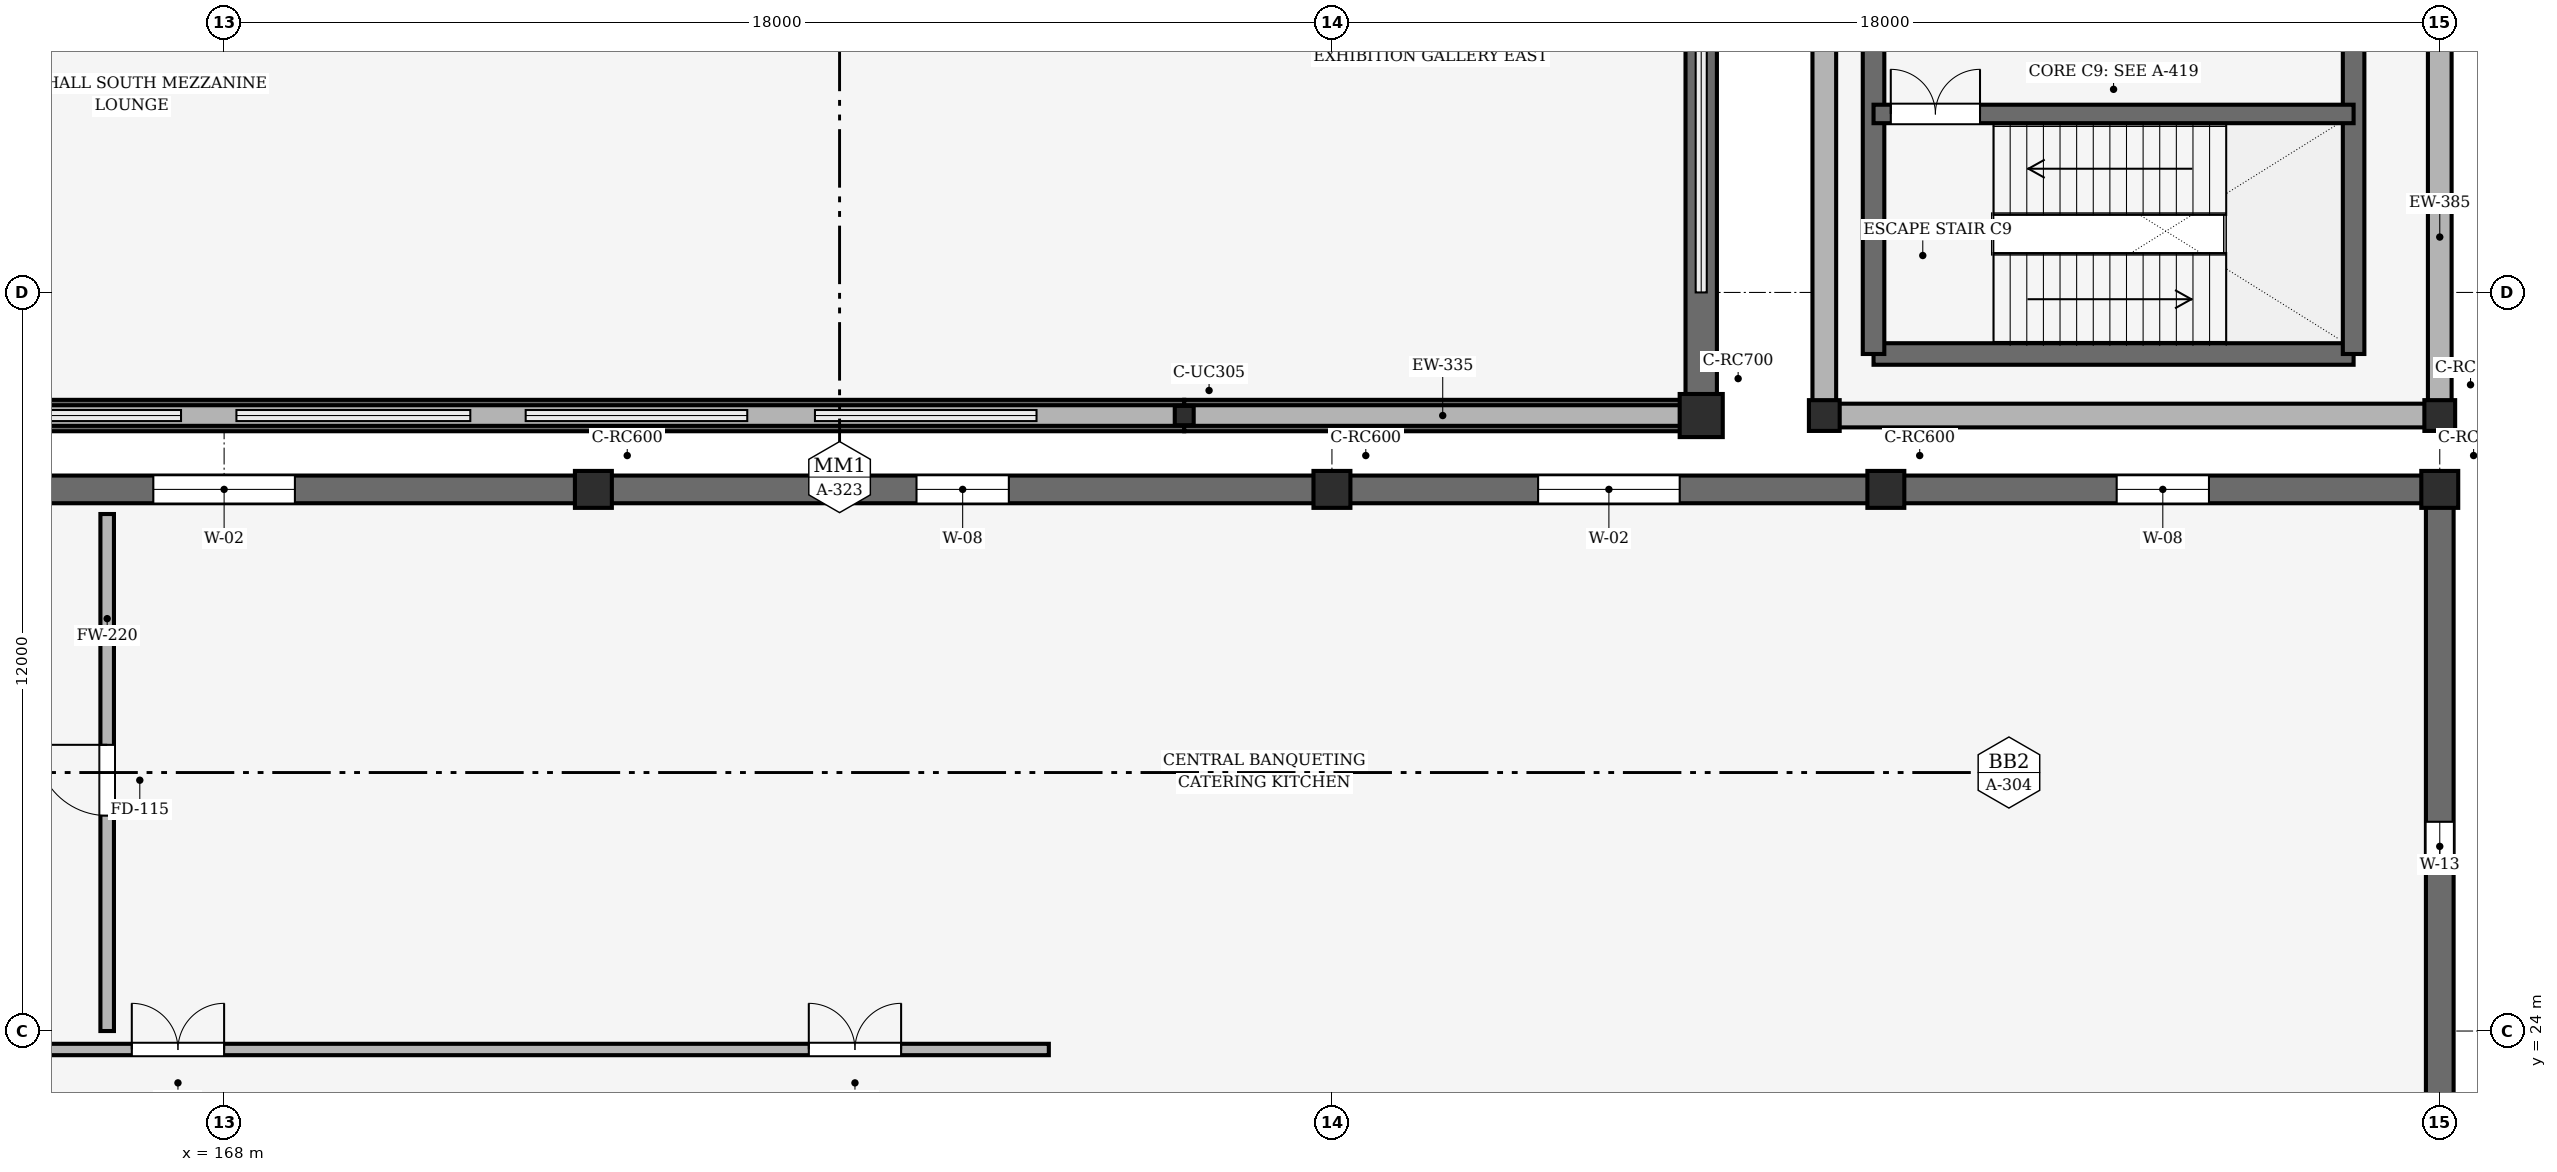
"""IFC4 building model, lengths in metres.
Left out: names, types, materials, properties, quantities, classifications, styles, units other than length and angle.
Written with IfcOpenShell. Run it as: python <this file> out.ifc"""

import sys

from ifc_helpers import new_model, si_unit, direction, frame, frame_2d, origin, origin_2d, place, context, subcontext, project, spatial, rectangle, i_section, extrude, element, fill, save


model = new_model("IFC4")
c1 = context("Model", 3, precision=1e-05, world=origin(), true_north=direction((0.0, 1.0)))
c2 = subcontext(c1, "Body", "Model", "MODEL_VIEW")
j1 = project(units=[si_unit("LENGTHUNIT", "METRE"), si_unit("PLANEANGLEUNIT", "RADIAN")], contexts=[c1])
p1 = place(None, origin())
s1 = spatial("IfcSite", under=j1, at=p1, CompositionType="ELEMENT")
p2 = place(p1, origin())
s2 = spatial("IfcBuilding", under=s1, at=p2, CompositionType="ELEMENT")
p3 = place(p2, frame((0.0, 0.0, 5.4)))
s3 = spatial("IfcBuildingStorey", under=s2, at=p3, CompositionType="ELEMENT", Elevation=5.4)
p4 = place(p3, frame((192.0, 34.0, 0.0), z_axis=(0.0, 0.0, 1.0), x_axis=(1.0, 0.0, 0.0)))
e1 = element("IfcColumn", 1, at=p4, inside=s3, PredefinedType="COLUMN", context=c2, shape_type="SweptSolid", body=[
    extrude(rectangle(XDim=0.7, YDim=0.7, at=origin_2d()), origin(), (0.0, 0.0, 1.0), 6.7),
])
p5 = place(p3, frame((183.6, 34.0, 0.0), z_axis=(0.0, 0.0, 1.0), x_axis=(1.0, 0.0, 0.0)))
e2 = element("IfcColumn", 2, at=p5, inside=s3, PredefinedType="COLUMN", context=c2, shape_type="SweptSolid", body=[
    extrude(i_section(OverallWidth=0.307, OverallDepth=0.314, WebThickness=0.012, FlangeThickness=0.019, FilletRadius=0.015, at=origin_2d()), origin(), (0.0, 0.0, 1.0), 6.5),
])
for number, where, z_axis, x_axis in (
    (3, (174.0, 32.8, 0.0), (0.0, 0.0, 1.0), (1.0, 0.0, 0.0)),
    (4, (186.0, 32.8, 0.0), (0.0, 0.0, 1.0), (1.0, 0.0, 0.0)),
    (5, (195.0, 32.8, 0.0), (0.0, 0.0, 1.0), (1.0, 0.0, 0.0)),
    (6, (204.0, 32.8, 0.0), (0.0, 0.0, 1.0), (1.0, 0.0, 0.0)),
):
    element("IfcColumn", number, at=place(p3, frame(where, z_axis=z_axis, x_axis=x_axis)), inside=s3, PredefinedType="COLUMN", context=c2, shape_type="SweptSolid", body=[
        extrude(rectangle(XDim=0.6, YDim=0.6, at=origin_2d()), origin(), (0.0, 0.0, 1.0), 5.4),
    ])
for number, where, z_axis, x_axis in (
    (7, (194.0, 34.0, 0.0), (0.0, 0.0, 1.0), (1.0, 0.0, 0.0)),
    (8, (204.0, 34.0, 0.0), (0.0, 0.0, 1.0), (1.0, 0.0, 0.0)),
):
    element("IfcColumn", number, at=place(p3, frame(where, z_axis=z_axis, x_axis=x_axis)), inside=s3, PredefinedType="COLUMN", context=c2, shape_type="SweptSolid", body=[
        extrude(rectangle(XDim=0.5, YDim=0.5, at=origin_2d()), origin(), (0.0, 0.0, 1.0), 5.4),
    ])
p6 = place(p3, frame((192.0, 34.0, 0.0), z_axis=(0.0, 0.0, 1.0), x_axis=(0.0, 1.0, 0.0)))
e9 = element("IfcWall", 9, at=p6, inside=s3, PredefinedType="SOLIDWALL", context=c2, shape_type="SweptSolid", body=[
    extrude(rectangle(XDim=14.0, YDim=0.51, at=frame_2d((7.0, 0.0))), origin(), (0.0, 0.0, 1.0), 3.65),
])
p7 = place(p3, frame((148.4, 34.0, 0.0), z_axis=(0.0, 0.0, 1.0), x_axis=(1.0, 0.0, 0.0)))
e10 = element("IfcWall", 10, at=p7, inside=s3, PredefinedType="SOLIDWALL", context=c2, shape_type="SweptSolid", body=[
    extrude(rectangle(XDim=35.2, YDim=0.51, at=frame_2d((17.6, 0.0))), origin(), (0.0, 0.0, 1.0), 1.05),
])
p8 = place(p3, frame((183.6, 34.0, 0.0), z_axis=(0.0, 0.0, 1.0), x_axis=(1.0, 0.0, 0.0)))
e11 = element("IfcWall", 11, at=p8, inside=s3, PredefinedType="SOLIDWALL", context=c2, shape_type="SweptSolid", body=[
    extrude(rectangle(XDim=8.4, YDim=0.51, at=frame_2d((4.2, 0.0))), origin(), (0.0, 0.0, 1.0), 6.4),
])
p9 = place(p3, frame((174.0, 32.8, 0.0), z_axis=(0.0, 0.0, 1.0), x_axis=(-1.0, 0.0, 0.0)))
e12 = element("IfcWall", 12, at=p9, inside=s3, PredefinedType="SOLIDWALL", context=c2, shape_type="SweptSolid", body=[
    extrude(rectangle(XDim=12.0, YDim=0.45, at=frame_2d((6.0, 0.0))), origin(), (0.0, 0.0, 1.0), 4.3),
])
p10 = place(p9, frame((4.85, 0.0, 0.9)))
e13 = element("IfcOpeningElement", 13, at=p10, cuts=e12, PredefinedType="OPENING", context=c2, shape_type="SweptSolid", body=[
    extrude(rectangle(XDim=2.3, YDim=3.1, at=frame_2d((1.15, 1.55))), frame((0.0, 0.235, 0.0), z_axis=(0.0, -1.0, 0.0), x_axis=(1.0, 0.0, 0.0)), (0.0, 0.0, 1.0), 0.47),
])
p11 = place(p3, frame((186.0, 32.8, 0.0), z_axis=(0.0, 0.0, 1.0), x_axis=(-1.0, 0.0, 0.0)))
e14 = element("IfcWall", 14, at=p11, inside=s3, PredefinedType="SOLIDWALL", context=c2, shape_type="SweptSolid", body=[
    extrude(rectangle(XDim=12.0, YDim=0.45, at=frame_2d((6.0, 0.0))), origin(), (0.0, 0.0, 1.0), 4.3),
])
p12 = place(p11, frame((5.25, 0.0, 0.9)))
e15 = element("IfcOpeningElement", 15, at=p12, cuts=e14, PredefinedType="OPENING", context=c2, shape_type="SweptSolid", body=[
    extrude(rectangle(XDim=1.5, YDim=2.15, at=frame_2d((0.75, 1.075))), frame((0.0, 0.235, 0.0), z_axis=(0.0, -1.0, 0.0), x_axis=(1.0, 0.0, 0.0)), (0.0, 0.0, 1.0), 0.47),
])
p13 = place(p3, frame((195.0, 32.8, 0.0), z_axis=(0.0, 0.0, 1.0), x_axis=(-1.0, 0.0, 0.0)))
e16 = element("IfcWall", 16, at=p13, inside=s3, PredefinedType="SOLIDWALL", context=c2, shape_type="SweptSolid", body=[
    extrude(rectangle(XDim=9.0, YDim=0.45, at=frame_2d((4.5, 0.0))), origin(), (0.0, 0.0, 1.0), 4.3),
])
p14 = place(p13, frame((3.35, 0.0, 0.9)))
e17 = element("IfcOpeningElement", 17, at=p14, cuts=e16, PredefinedType="OPENING", context=c2, shape_type="SweptSolid", body=[
    extrude(rectangle(XDim=2.3, YDim=3.1, at=frame_2d((1.15, 1.55))), frame((0.0, 0.235, 0.0), z_axis=(0.0, -1.0, 0.0), x_axis=(1.0, 0.0, 0.0)), (0.0, 0.0, 1.0), 0.47),
])
p15 = place(p3, frame((204.0, 32.8, 0.0), z_axis=(0.0, 0.0, 1.0), x_axis=(-1.0, 0.0, 0.0)))
e18 = element("IfcWall", 18, at=p15, inside=s3, PredefinedType="SOLIDWALL", context=c2, shape_type="SweptSolid", body=[
    extrude(rectangle(XDim=9.0, YDim=0.45, at=frame_2d((4.5, 0.0))), origin(), (0.0, 0.0, 1.0), 4.3),
])
p16 = place(p15, frame((3.75, 0.0, 0.9)))
e19 = element("IfcOpeningElement", 19, at=p16, cuts=e18, PredefinedType="OPENING", context=c2, shape_type="SweptSolid", body=[
    extrude(rectangle(XDim=1.5, YDim=2.15, at=frame_2d((0.75, 1.075))), frame((0.0, 0.235, 0.0), z_axis=(0.0, -1.0, 0.0), x_axis=(1.0, 0.0, 0.0)), (0.0, 0.0, 1.0), 0.47),
])
p17 = place(p3, frame((204.0, 21.8, 0.0), z_axis=(0.0, 0.0, 1.0), x_axis=(0.0, 1.0, 0.0)))
e20 = element("IfcWall", 20, at=p17, inside=s3, PredefinedType="SOLIDWALL", context=c2, shape_type="SweptSolid", body=[
    extrude(rectangle(XDim=11.0, YDim=0.45, at=frame_2d((5.5, 0.0))), origin(), (0.0, 0.0, 1.0), 4.3),
])
p18 = place(p17, frame((4.8, 0.0, 1.0)))
e21 = element("IfcOpeningElement", 21, at=p18, cuts=e20, PredefinedType="OPENING", context=c2, shape_type="SweptSolid", body=[
    extrude(rectangle(XDim=0.8, YDim=1.6, at=frame_2d((0.4, 0.8))), frame((0.0, 0.235, 0.0), z_axis=(0.0, -1.0, 0.0), x_axis=(1.0, 0.0, 0.0)), (0.0, 0.0, 1.0), 0.47),
])
p19 = place(p3, frame((204.0, 34.0, 0.0), z_axis=(0.0, 0.0, 1.0), x_axis=(0.0, 1.0, 0.0)))
e22 = element("IfcWall", 22, at=p19, inside=s3, PredefinedType="SOLIDWALL", context=c2, shape_type="SweptSolid", body=[
    extrude(rectangle(XDim=14.0, YDim=0.385, at=frame_2d((7.0, 0.0))), origin(), (0.0, 0.0, 1.0), 4.3),
])
p20 = place(p19, frame((6.15, 0.0, 0.9)))
e23 = element("IfcOpeningElement", 23, at=p20, cuts=e22, PredefinedType="OPENING", context=c2, shape_type="SweptSolid", body=[
    extrude(rectangle(XDim=1.7, YDim=2.5, at=frame_2d((0.85, 1.25))), frame((0.0, 0.202, 0.0), z_axis=(0.0, -1.0, 0.0), x_axis=(1.0, 0.0, 0.0)), (0.0, 0.0, 1.0), 0.405),
])
p21 = place(p3, frame((194.0, 48.0, 0.0), z_axis=(0.0, 0.0, 1.0), x_axis=(0.0, -1.0, 0.0)))
e24 = element("IfcWall", 24, at=p21, inside=s3, PredefinedType="SOLIDWALL", context=c2, shape_type="SweptSolid", body=[
    extrude(rectangle(XDim=14.0, YDim=0.385, at=frame_2d((7.0, 0.0))), origin(), (0.0, 0.0, 1.0), 4.3),
])
p22 = place(p3, frame((194.0, 34.0, 0.0), z_axis=(0.0, 0.0, 1.0), x_axis=(1.0, 0.0, 0.0)))
e25 = element("IfcWall", 25, at=p22, inside=s3, PredefinedType="SOLIDWALL", context=c2, shape_type="SweptSolid", body=[
    extrude(rectangle(XDim=10.0, YDim=0.385, at=frame_2d((5.0, 0.0))), origin(), (0.0, 0.0, 1.0), 4.3),
])
p23 = place(p3, frame((183.6, 34.0, 6.4), z_axis=(0.0, 0.0, 1.0), x_axis=(1.0, 0.0, 0.0)))
e26 = element("IfcWall", 26, at=p23, inside=s3, PredefinedType="SOLIDWALL", context=c2, shape_type="SweptSolid", body=[
    extrude(rectangle(XDim=8.4, YDim=0.335, at=frame_2d((4.2, 0.0))), origin(), (0.0, 0.0, 1.0), 2.118),
])
p24 = place(p3, frame((148.4, 34.0, 6.45), z_axis=(0.0, 0.0, 1.0), x_axis=(1.0, 0.0, 0.0)))
e27 = element("IfcWall", 27, at=p24, inside=s3, PredefinedType="SOLIDWALL", context=c2, shape_type="SweptSolid", body=[
    extrude(rectangle(XDim=35.2, YDim=0.335, at=frame_2d((17.6, 0.0))), origin(), (0.0, 0.0, 1.0), 3.15),
])
p25 = place(p3, frame((194.8, 35.0, 0.0), z_axis=(0.0, 0.0, 1.0), x_axis=(1.0, 0.0, 0.0)))
e28 = element("IfcWall", 28, at=p25, inside=s3, PredefinedType="SHEAR", context=c2, shape_type="SweptSolid", body=[
    extrude(rectangle(XDim=7.8, YDim=0.35, at=frame_2d((3.9, 0.0))), origin(), (0.0, 0.0, 1.0), 5.4),
])
for number, where, z_axis, x_axis in (
    (29, (194.8, 43.6, 0.0), (0.0, 0.0, 1.0), (0.0, -1.0, 0.0)),
    (30, (202.6, 35.0, 0.0), (0.0, 0.0, 1.0), (0.0, 1.0, 0.0)),
):
    element("IfcWall", number, at=place(p3, frame(where, z_axis=z_axis, x_axis=x_axis)), inside=s3, PredefinedType="SHEAR", context=c2, shape_type="SweptSolid", body=[
        extrude(rectangle(XDim=8.6, YDim=0.35, at=frame_2d((4.3, 0.0))), origin(), (0.0, 0.0, 1.0), 5.4),
    ])
p26 = place(p3, frame((194.8, 38.9, 0.0), z_axis=(0.0, 0.0, 1.0), x_axis=(1.0, 0.0, 0.0)))
e31 = element("IfcWall", 31, at=p26, inside=s3, PredefinedType="SHEAR", context=c2, shape_type="SweptSolid", body=[
    extrude(rectangle(XDim=7.8, YDim=0.3, at=frame_2d((3.9, 0.0))), origin(), (0.0, 0.0, 1.0), 5.4),
])
p27 = place(p26, frame((0.28, 0.0, 0.0)))
e32 = element("IfcOpeningElement", 32, at=p27, cuts=e31, PredefinedType="OPENING", context=c2, shape_type="SweptSolid", body=[
    extrude(rectangle(XDim=1.45, YDim=2.15, at=frame_2d((0.725, 1.075))), frame((0.0, 0.16, 0.0), z_axis=(0.0, -1.0, 0.0), x_axis=(1.0, 0.0, 0.0)), (0.0, 0.0, 1.0), 0.32),
])
p28 = place(p3, frame((137.8, 23.7, 0.0), z_axis=(0.0, 0.0, 1.0), x_axis=(1.0, 0.0, 0.0)))
e33 = element("IfcWall", 33, at=p28, inside=s3, PredefinedType="PARTITIONING", context=c2, shape_type="SweptSolid", body=[
    extrude(rectangle(XDim=43.6, YDim=0.185, at=frame_2d((21.8, 0.0))), origin(), (0.0, 0.0, 1.0), 3.6),
])
p29 = place(p28, frame((5.7, 0.0, 0.0)))
e34 = element("IfcOpeningElement", 34, at=p29, cuts=e33, PredefinedType="OPENING", context=c2, shape_type="SweptSolid", body=[
    extrude(rectangle(XDim=1.5, YDim=2.2, at=frame_2d((0.75, 1.1))), frame((0.0, 0.103, 0.0), z_axis=(0.0, -1.0, 0.0), x_axis=(1.0, 0.0, 0.0)), (0.0, 0.0, 1.0), 0.205),
])
p30 = place(p28, frame((28.7, 0.0, 0.0)))
e35 = element("IfcOpeningElement", 35, at=p30, cuts=e33, PredefinedType="OPENING", context=c2, shape_type="SweptSolid", body=[
    extrude(rectangle(XDim=1.5, YDim=2.2, at=frame_2d((0.75, 1.1))), frame((0.0, 0.103, 0.0), z_axis=(0.0, -1.0, 0.0), x_axis=(1.0, 0.0, 0.0)), (0.0, 0.0, 1.0), 0.205),
])
p31 = place(p28, frame((39.7, 0.0, 0.0)))
e36 = element("IfcOpeningElement", 36, at=p31, cuts=e33, PredefinedType="OPENING", context=c2, shape_type="SweptSolid", body=[
    extrude(rectangle(XDim=1.5, YDim=2.2, at=frame_2d((0.75, 1.1))), frame((0.0, 0.103, 0.0), z_axis=(0.0, -1.0, 0.0), x_axis=(1.0, 0.0, 0.0)), (0.0, 0.0, 1.0), 0.205),
])
p32 = place(p3, frame((166.1, 24.0, 0.0), z_axis=(0.0, 0.0, 1.0), x_axis=(0.0, 1.0, 0.0)))
e37 = element("IfcWall", 37, at=p32, inside=s3, PredefinedType="SOLIDWALL", context=c2, shape_type="SweptSolid", body=[
    extrude(rectangle(XDim=8.4, YDim=0.22, at=frame_2d((4.2, 0.0))), origin(), (0.0, 0.0, 1.0), 3.6),
])
p33 = place(p32, frame((3.5, 0.0, 0.0)))
e38 = element("IfcOpeningElement", 38, at=p33, cuts=e37, PredefinedType="OPENING", context=c2, shape_type="SweptSolid", body=[
    extrude(rectangle(XDim=1.15, YDim=2.15, at=frame_2d((0.575, 1.075))), frame((0.0, 0.12, 0.0), z_axis=(0.0, -1.0, 0.0), x_axis=(1.0, 0.0, 0.0)), (0.0, 0.0, 1.0), 0.24),
])
p34 = place(p10, origin())
e39 = element("IfcWindow", 39, at=p34, inside=s3, PartitioningType="DOUBLE_PANEL_VERTICAL", PredefinedType="WINDOW", context=c2, shape_type="SweptSolid", body=[
    extrude(rectangle(XDim=2.3, YDim=3.1, at=frame_2d((1.15, 1.55))), frame((0.0, 0.03, 0.0), z_axis=(0.0, -1.0, 0.0), x_axis=(1.0, 0.0, 0.0)), (0.0, 0.0, 1.0), 0.06),
])
fill(e13, e39)
p35 = place(p12, origin())
e40 = element("IfcWindow", 40, at=p35, inside=s3, PartitioningType="DOUBLE_PANEL_VERTICAL", PredefinedType="WINDOW", context=c2, shape_type="SweptSolid", body=[
    extrude(rectangle(XDim=1.5, YDim=2.15, at=frame_2d((0.75, 1.075))), frame((0.0, 0.03, 0.0), z_axis=(0.0, -1.0, 0.0), x_axis=(1.0, 0.0, 0.0)), (0.0, 0.0, 1.0), 0.06),
])
fill(e15, e40)
p36 = place(p14, origin())
e41 = element("IfcWindow", 41, at=p36, inside=s3, PartitioningType="DOUBLE_PANEL_VERTICAL", PredefinedType="WINDOW", context=c2, shape_type="SweptSolid", body=[
    extrude(rectangle(XDim=2.3, YDim=3.1, at=frame_2d((1.15, 1.55))), frame((0.0, 0.03, 0.0), z_axis=(0.0, -1.0, 0.0), x_axis=(1.0, 0.0, 0.0)), (0.0, 0.0, 1.0), 0.06),
])
fill(e17, e41)
p37 = place(p16, origin())
e42 = element("IfcWindow", 42, at=p37, inside=s3, PartitioningType="DOUBLE_PANEL_VERTICAL", PredefinedType="WINDOW", context=c2, shape_type="SweptSolid", body=[
    extrude(rectangle(XDim=1.5, YDim=2.15, at=frame_2d((0.75, 1.075))), frame((0.0, 0.03, 0.0), z_axis=(0.0, -1.0, 0.0), x_axis=(1.0, 0.0, 0.0)), (0.0, 0.0, 1.0), 0.06),
])
fill(e19, e42)
p38 = place(p18, origin())
e43 = element("IfcWindow", 43, at=p38, inside=s3, PartitioningType="SINGLE_PANEL", PredefinedType="WINDOW", context=c2, shape_type="SweptSolid", body=[
    extrude(rectangle(XDim=0.8, YDim=1.6, at=frame_2d((0.4, 0.8))), frame((0.0, 0.03, 0.0), z_axis=(0.0, -1.0, 0.0), x_axis=(1.0, 0.0, 0.0)), (0.0, 0.0, 1.0), 0.06),
])
fill(e21, e43)
p39 = place(p27, origin())
e44 = element("IfcDoor", 44, at=p39, inside=s3, OperationType="DOUBLE_DOOR_SINGLE_SWING", PredefinedType="DOOR", context=c2, shape_type="SweptSolid", body=[
    extrude(rectangle(XDim=1.45, YDim=2.15, at=frame_2d((0.725, 1.075))), frame((0.0, 0.025, 0.0), z_axis=(0.0, -1.0, 0.0), x_axis=(1.0, 0.0, 0.0)), (0.0, 0.0, 1.0), 0.05),
])
fill(e32, e44)
p40 = place(p30, origin())
e45 = element("IfcDoor", 45, at=p40, inside=s3, OperationType="DOUBLE_DOOR_SINGLE_SWING", PredefinedType="DOOR", context=c2, shape_type="SweptSolid", body=[
    extrude(rectangle(XDim=1.5, YDim=2.2, at=frame_2d((0.75, 1.1))), frame((0.0, 0.025, 0.0), z_axis=(0.0, -1.0, 0.0), x_axis=(1.0, 0.0, 0.0)), (0.0, 0.0, 1.0), 0.05),
])
fill(e35, e45)
p41 = place(p31, origin())
e46 = element("IfcDoor", 46, at=p41, inside=s3, OperationType="DOUBLE_DOOR_SINGLE_SWING", PredefinedType="DOOR", context=c2, shape_type="SweptSolid", body=[
    extrude(rectangle(XDim=1.5, YDim=2.2, at=frame_2d((0.75, 1.1))), frame((0.0, 0.025, 0.0), z_axis=(0.0, -1.0, 0.0), x_axis=(1.0, 0.0, 0.0)), (0.0, 0.0, 1.0), 0.05),
])
fill(e36, e46)
p42 = place(p33, origin())
e47 = element("IfcDoor", 47, at=p42, inside=s3, OperationType="SINGLE_SWING_RIGHT", PredefinedType="DOOR", context=c2, shape_type="SweptSolid", body=[
    extrude(rectangle(XDim=1.15, YDim=2.15, at=frame_2d((0.575, 1.075))), frame((0.0, 0.025, 0.0), z_axis=(0.0, -1.0, 0.0), x_axis=(1.0, 0.0, 0.0)), (0.0, 0.0, 1.0), 0.05),
])
fill(e38, e47)
save(model, sys.argv[1])
